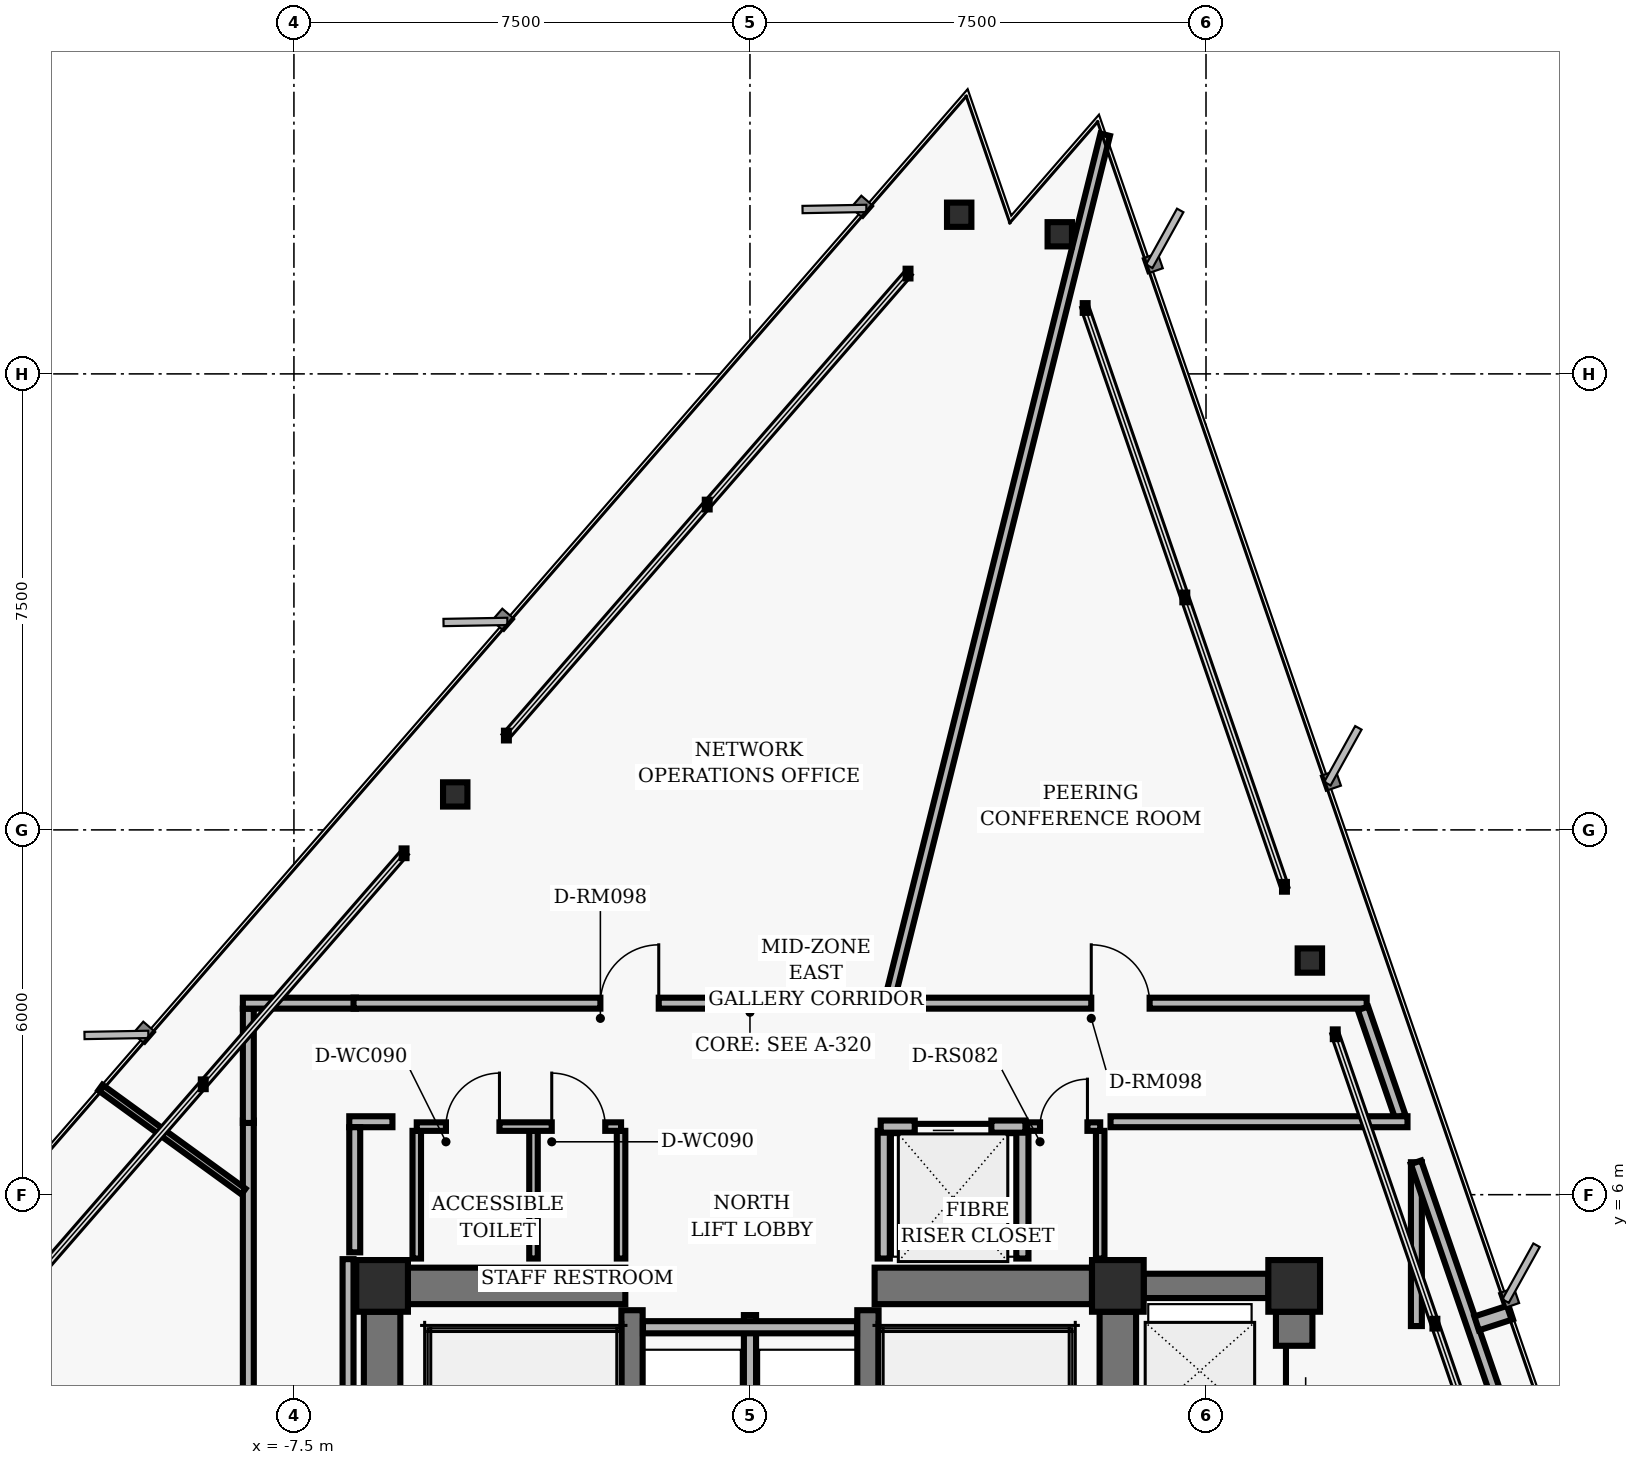
"""IFC4 building model, lengths in metres.
Left out: names, types, materials, properties, quantities, classifications, styles, units other than length and angle.
Written with IfcOpenShell. Run it as: python <this file> out.ifc"""

import sys

from ifc_helpers import new_model, si_unit, direction, frame, frame_2d, origin, origin_2d, place, context, subcontext, project, spatial, rectangle, hollow_rectangle, i_section, extrude, element, fill, save


model = new_model("IFC4")
c1 = context("Model", 3, precision=1e-05, world=origin(), true_north=direction((0.0, 1.0)))
c2 = subcontext(c1, "Body", "Model", "MODEL_VIEW")
j1 = project(units=[si_unit("LENGTHUNIT", "METRE"), si_unit("PLANEANGLEUNIT", "RADIAN")], contexts=[c1])
p1 = place(None, origin())
s1 = spatial("IfcSite", under=j1, at=p1, CompositionType="ELEMENT")
p2 = place(p1, origin())
s2 = spatial("IfcBuilding", under=s1, at=p2, CompositionType="ELEMENT")
p3 = place(p2, frame((0.0, 0.0, 150.24)))
s3 = spatial("IfcBuildingStorey", under=s2, at=p3, CompositionType="ELEMENT", Elevation=150.24)
for number, where, z_axis, x_axis in (
    (1, (-6.05, 4.5, 0.0), (0.0, 0.0, 1.0), (1.0, 0.0, 0.0)),
    (2, (6.05, 4.5, 0.0), (0.0, 0.0, 1.0), (1.0, 0.0, 0.0)),
    (3, (8.95, 4.5, 0.0), (0.0, 0.0, 1.0), (1.0, 0.0, 0.0)),
):
    element("IfcColumn", number, at=place(p3, frame(where, z_axis=z_axis, x_axis=x_axis)), inside=s3, PredefinedType="COLUMN", context=c2, shape_type="SweptSolid", body=[
        extrude(hollow_rectangle(XDim=0.85, YDim=0.85, WallThickness=0.055, InnerFilletRadius=0.02, OuterFilletRadius=0.04, at=origin_2d()), origin(), (0.0, 0.0, 1.0), 3.04),
    ])
for number, where, z_axis, x_axis in (
    (4, (-6.05, 0.425, 0.0), (0.0, 0.0, 1.0), (0.0, 1.0, 0.0)),
    (5, (6.05, 0.425, 0.0), (0.0, 0.0, 1.0), (0.0, 1.0, 0.0)),
):
    element("IfcWall", number, at=place(p3, frame(where, z_axis=z_axis, x_axis=x_axis)), inside=s3, PredefinedType="SHEAR", context=c2, shape_type="SweptSolid", body=[
        extrude(rectangle(XDim=3.65, YDim=0.6, at=frame_2d((1.825, 0.0))), origin(), (0.0, 0.0, 1.0), 2.788),
    ])
for number, where, z_axis, x_axis in (
    (6, (-1.94, -4.1, 0.0), (0.0, 0.0, 1.0), (0.0, 1.0, 0.0)),
    (7, (1.94, -4.1, 0.0), (0.0, 0.0, 1.0), (0.0, 1.0, 0.0)),
):
    element("IfcWall", number, at=place(p3, frame(where, z_axis=z_axis, x_axis=x_axis)), inside=s3, PredefinedType="SHEAR", context=c2, shape_type="SweptSolid", body=[
        extrude(rectangle(XDim=8.2, YDim=0.35, at=frame_2d((4.1, 0.0))), origin(), (0.0, 0.0, 1.0), 2.788),
    ])
for number, where, z_axis, x_axis in (
    (8, (-5.625, 4.5, 0.0), (0.0, 0.0, 1.0), (1.0, 0.0, 0.0)),
    (9, (2.05, 4.5, 0.0), (0.0, 0.0, 1.0), (1.0, 0.0, 0.0)),
):
    element("IfcWall", number, at=place(p3, frame(where, z_axis=z_axis, x_axis=x_axis)), inside=s3, PredefinedType="SHEAR", context=c2, shape_type="SweptSolid", body=[
        extrude(rectangle(XDim=3.575, YDim=0.6, at=frame_2d((1.788, 0.0))), origin(), (0.0, 0.0, 1.0), 2.788),
    ])
p4 = place(p3, frame((8.95, -3.875, 0.0), z_axis=(0.0, 0.0, 1.0), x_axis=(0.0, 1.0, 0.0)))
e10 = element("IfcWall", 10, at=p4, inside=s3, PredefinedType="SHEAR", context=c2, shape_type="SweptSolid", body=[
    extrude(rectangle(XDim=7.95, YDim=0.6, at=frame_2d((3.975, 0.0))), origin(), (0.0, 0.0, 1.0), 2.788),
])
p5 = place(p4, frame((0.55, 0.0, 0.0)))
e11 = element("IfcOpeningElement", 11, at=p5, cuts=e10, PredefinedType="OPENING", context=c2, shape_type="SweptSolid", body=[
    extrude(rectangle(XDim=1.06, YDim=2.04, at=frame_2d((0.53, 1.02))), frame((0.0, 0.31, 0.0), z_axis=(0.0, -1.0, 0.0), x_axis=(1.0, 0.0, 0.0)), (0.0, 0.0, 1.0), 0.62),
])
p6 = place(p4, frame((3.445, 0.0, 0.0)))
e12 = element("IfcOpeningElement", 12, at=p6, cuts=e10, PredefinedType="OPENING", context=c2, shape_type="SweptSolid", body=[
    extrude(rectangle(XDim=1.06, YDim=2.04, at=frame_2d((0.53, 1.02))), frame((0.0, 0.31, 0.0), z_axis=(0.0, -1.0, 0.0), x_axis=(1.0, 0.0, 0.0)), (0.0, 0.0, 1.0), 0.62),
])
p7 = place(p4, frame((6.33, 0.0, 0.0)))
e13 = element("IfcOpeningElement", 13, at=p7, cuts=e10, PredefinedType="OPENING", context=c2, shape_type="SweptSolid", body=[
    extrude(rectangle(XDim=1.06, YDim=2.04, at=frame_2d((0.53, 1.02))), frame((0.0, 0.31, 0.0), z_axis=(0.0, -1.0, 0.0), x_axis=(1.0, 0.0, 0.0)), (0.0, 0.0, 1.0), 0.62),
])
p8 = place(p3, frame((6.475, 4.5, 0.0), z_axis=(0.0, 0.0, 1.0), x_axis=(1.0, 0.0, 0.0)))
e14 = element("IfcWall", 14, at=p8, inside=s3, PredefinedType="SHEAR", context=c2, shape_type="SweptSolid", body=[
    extrude(rectangle(XDim=2.05, YDim=0.4, at=frame_2d((1.025, 0.0))), origin(), (0.0, 0.0, 1.0), 2.788),
])
for number, where, z_axis, x_axis in (
    (15, (9.208, 9.851, 0.0), (0.0, 0.0, 1.0), (1.0, 0.0, 0.0)),
    (16, (5.095, 21.796, 0.0), (0.0, 0.0, 1.0), (1.0, 0.0, 0.0)),
    (17, (3.441, 22.118, 0.0), (0.0, 0.0, 1.0), (1.0, 0.0, 0.0)),
    (18, (-4.847, 12.583, 0.0), (0.0, 0.0, 1.0), (1.0, 0.0, 0.0)),
):
    element("IfcColumn", number, at=place(p3, frame(where, z_axis=z_axis, x_axis=x_axis)), inside=s3, PredefinedType="COLUMN", context=c2, shape_type="SweptSolid", body=[
        extrude(i_section(OverallWidth=0.401, OverallDepth=0.399, WebThickness=0.025, FlangeThickness=0.04, FilletRadius=0.018, at=origin_2d()), origin(), (0.0, 0.0, 1.0), 3.04),
    ])
p9 = place(p3, frame((0.0, 1.25, 0.0), z_axis=(0.0, 0.0, 1.0), x_axis=(0.0, 1.0, 0.0)))
e19 = element("IfcWall", 19, at=p9, inside=s3, PredefinedType="PARTITIONING", context=c2, shape_type="SweptSolid", body=[
    extrude(rectangle(XDim=2.77, YDim=0.2, at=frame_2d((1.385, 0.0))), origin(), (0.0, 0.0, 1.0), 2.763),
])
p10 = place(p3, frame((-1.76, 3.82, 0.0), z_axis=(0.0, 0.0, 1.0), x_axis=(1.0, 0.0, 0.0)))
e20 = element("IfcWall", 20, at=p10, inside=s3, PredefinedType="PARTITIONING", context=c2, shape_type="SweptSolid", body=[
    extrude(rectangle(XDim=3.52, YDim=0.2, at=frame_2d((1.76, 0.0))), origin(), (0.0, 0.0, 1.0), 2.763),
])
for number, where, z_axis, x_axis in (
    (21, (2.2, 4.95, 0.0), (0.0, 0.0, 1.0), (0.0, 1.0, 0.0)),
    (22, (4.48, 4.95, 0.0), (0.0, 0.0, 1.0), (0.0, 1.0, 0.0)),
):
    element("IfcWall", number, at=place(p3, frame(where, z_axis=z_axis, x_axis=x_axis)), inside=s3, PredefinedType="PARTITIONING", context=c2, shape_type="SweptSolid", body=[
        extrude(rectangle(XDim=2.1, YDim=0.2, at=frame_2d((1.05, 0.0))), origin(), (0.0, 0.0, 1.0), 2.763),
    ])
p11 = place(p3, frame((2.15, 7.12, 0.0), z_axis=(0.0, 0.0, 1.0), x_axis=(1.0, 0.0, 0.0)))
e23 = element("IfcWall", 23, at=p11, inside=s3, PredefinedType="PARTITIONING", context=c2, shape_type="SweptSolid", body=[
    extrude(rectangle(XDim=2.38, YDim=0.2, at=frame_2d((1.19, 0.0))), origin(), (0.0, 0.0, 1.0), 2.763),
])
p12 = place(p11, frame((0.56, 0.0, 0.0)))
e24 = element("IfcOpeningElement", 24, at=p12, cuts=e23, PredefinedType="OPENING", context=c2, shape_type="SweptSolid", body=[
    extrude(rectangle(XDim=1.26, YDim=2.06, at=frame_2d((0.63, 1.03))), frame((0.0, 0.11, 0.0), z_axis=(0.0, -1.0, 0.0), x_axis=(1.0, 0.0, 0.0)), (0.0, 0.0, 1.0), 0.22),
])
for number, where, z_axis, x_axis in (
    (25, (-5.48, 4.95, 0.0), (0.0, 0.0, 1.0), (0.0, 1.0, 0.0)),
    (26, (-3.56, 4.95, 0.0), (0.0, 0.0, 1.0), (0.0, 1.0, 0.0)),
    (27, (-2.12, 4.95, 0.0), (0.0, 0.0, 1.0), (0.0, 1.0, 0.0)),
):
    element("IfcWall", number, at=place(p3, frame(where, z_axis=z_axis, x_axis=x_axis)), inside=s3, PredefinedType="PARTITIONING", context=c2, shape_type="SweptSolid", body=[
        extrude(rectangle(XDim=2.1, YDim=0.14, at=frame_2d((1.05, 0.0))), origin(), (0.0, 0.0, 1.0), 2.763),
    ])
p13 = place(p3, frame((-5.48, 7.12, 0.0), z_axis=(0.0, 0.0, 1.0), x_axis=(1.0, 0.0, 0.0)))
e28 = element("IfcWall", 28, at=p13, inside=s3, PredefinedType="PARTITIONING", context=c2, shape_type="SweptSolid", body=[
    extrude(rectangle(XDim=3.36, YDim=0.14, at=frame_2d((1.68, 0.0))), origin(), (0.0, 0.0, 1.0), 2.763),
])
p14 = place(p13, frame((0.48, 0.0, 0.0)))
e29 = element("IfcOpeningElement", 29, at=p14, cuts=e28, PredefinedType="OPENING", context=c2, shape_type="SweptSolid", body=[
    extrude(rectangle(XDim=0.88, YDim=2.02, at=frame_2d((0.44, 1.01))), frame((0.0, 0.08, 0.0), z_axis=(0.0, -1.0, 0.0), x_axis=(1.0, 0.0, 0.0)), (0.0, 0.0, 1.0), 0.16),
])
p15 = place(p13, frame((2.22, 0.0, 0.0)))
e30 = element("IfcOpeningElement", 30, at=p15, cuts=e28, PredefinedType="OPENING", context=c2, shape_type="SweptSolid", body=[
    extrude(rectangle(XDim=0.88, YDim=2.02, at=frame_2d((0.44, 1.01))), frame((0.0, 0.08, 0.0), z_axis=(0.0, -1.0, 0.0), x_axis=(1.0, 0.0, 0.0)), (0.0, 0.0, 1.0), 0.16),
])
p16 = place(p3, frame((5.76, 4.95, 0.0), z_axis=(0.0, 0.0, 1.0), x_axis=(0.0, 1.0, 0.0)))
e31 = element("IfcWall", 31, at=p16, inside=s3, PredefinedType="PARTITIONING", context=c2, shape_type="SweptSolid", body=[
    extrude(rectangle(XDim=2.1, YDim=0.14, at=frame_2d((1.05, 0.0))), origin(), (0.0, 0.0, 1.0), 2.763),
])
p17 = place(p3, frame((4.56, 7.12, 0.0), z_axis=(0.0, 0.0, 1.0), x_axis=(1.0, 0.0, 0.0)))
e32 = element("IfcWall", 32, at=p17, inside=s3, PredefinedType="PARTITIONING", context=c2, shape_type="SweptSolid", body=[
    extrude(rectangle(XDim=1.2, YDim=0.14, at=frame_2d((0.6, 0.0))), origin(), (0.0, 0.0, 1.0), 2.763),
])
p18 = place(p17, frame((0.21, 0.0, 0.0)))
e33 = element("IfcOpeningElement", 33, at=p18, cuts=e32, PredefinedType="OPENING", context=c2, shape_type="SweptSolid", body=[
    extrude(rectangle(XDim=0.78, YDim=2.01, at=frame_2d((0.39, 1.005))), frame((0.0, 0.08, 0.0), z_axis=(0.0, -1.0, 0.0), x_axis=(1.0, 0.0, 0.0)), (0.0, 0.0, 1.0), 0.16),
])
p19 = place(p3, frame((-8.25, -7.22, 0.0), z_axis=(0.0, 0.0, 1.0), x_axis=(0.0, 1.0, 0.0)))
e34 = element("IfcWall", 34, at=p19, inside=s3, PredefinedType="PARTITIONING", context=c2, shape_type="SweptSolid", body=[
    extrude(rectangle(XDim=14.44, YDim=0.18, at=frame_2d((7.22, 0.0))), origin(), (0.0, 0.0, 1.0), 2.763),
])
p20 = place(p19, frame((7.366, 0.0, 0.0)))
e35 = element("IfcOpeningElement", 35, at=p20, cuts=e34, PredefinedType="OPENING", context=c2, shape_type="SweptSolid", body=[
    extrude(rectangle(XDim=0.96, YDim=2.02, at=frame_2d((0.48, 1.01))), frame((0.0, 0.1, 0.0), z_axis=(0.0, -1.0, 0.0), x_axis=(1.0, 0.0, 0.0)), (0.0, 0.0, 1.0), 0.2),
])
p21 = place(p3, frame((-8.25, 7.18, 0.0), z_axis=(0.0, 0.0, 1.0), x_axis=(0.0, 1.0, 0.0)))
e36 = element("IfcWall", 36, at=p21, inside=s3, PredefinedType="PARTITIONING", context=c2, shape_type="SweptSolid", body=[
    extrude(rectangle(XDim=1.88, YDim=0.18, at=frame_2d((0.94, 0.0))), origin(), (0.0, 0.0, 1.0), 2.763),
])
p22 = place(p3, frame((-8.34, 9.15, 0.0), z_axis=(0.0, 0.0, 1.0), x_axis=(1.0, 0.0, 0.0)))
e37 = element("IfcWall", 37, at=p22, inside=s3, PredefinedType="PARTITIONING", context=c2, shape_type="SweptSolid", body=[
    extrude(rectangle(XDim=1.86, YDim=0.18, at=frame_2d((0.93, 0.0))), origin(), (0.0, 0.0, 1.0), 2.763),
])
p23 = place(p3, frame((-6.52, 9.15, 0.0), z_axis=(0.0, 0.0, 1.0), x_axis=(1.0, 0.0, 0.0)))
e38 = element("IfcWall", 38, at=p23, inside=s3, PredefinedType="PARTITIONING", context=c2, shape_type="SweptSolid", body=[
    extrude(rectangle(XDim=16.662, YDim=0.18, at=frame_2d((8.331, 0.0))), origin(), (0.0, 0.0, 1.0), 2.763),
])
p24 = place(p23, frame((12.133, 0.0, 0.0)))
e39 = element("IfcOpeningElement", 39, at=p24, cuts=e38, PredefinedType="OPENING", context=c2, shape_type="SweptSolid", body=[
    extrude(rectangle(XDim=0.96, YDim=2.02, at=frame_2d((0.48, 1.01))), frame((0.0, 0.1, 0.0), z_axis=(0.0, -1.0, 0.0), x_axis=(1.0, 0.0, 0.0)), (0.0, 0.0, 1.0), 0.2),
])
p25 = place(p23, frame((4.06, 0.0, 0.0)))
e40 = element("IfcOpeningElement", 40, at=p25, cuts=e38, PredefinedType="OPENING", context=c2, shape_type="SweptSolid", body=[
    extrude(rectangle(XDim=0.96, YDim=2.02, at=frame_2d((0.48, 1.01))), frame((0.0, 0.1, 0.0), z_axis=(0.0, -1.0, 0.0), x_axis=(1.0, 0.0, 0.0)), (0.0, 0.0, 1.0), 0.2),
])
p26 = place(p3, frame((10.082, 9.065, 0.0), z_axis=(0.0, 0.0, 1.0), x_axis=(0.325550958337, -0.945524496524, 0.0)))
e41 = element("IfcWall", 41, at=p26, inside=s3, PredefinedType="PARTITIONING", context=c2, shape_type="SweptSolid", body=[
    extrude(rectangle(XDim=1.882, YDim=0.18, at=frame_2d((0.941, 0.0))), origin(), (0.0, 0.0, 1.0), 2.763),
])
p27 = place(p3, frame((10.814, 7.2, 0.0), z_axis=(0.0, 0.0, 1.0), x_axis=(-1.0, 0.0, 0.0)))
e42 = element("IfcWall", 42, at=p27, inside=s3, PredefinedType="PARTITIONING", context=c2, shape_type="SweptSolid", body=[
    extrude(rectangle(XDim=4.884, YDim=0.18, at=frame_2d((2.442, 0.0))), origin(), (0.0, 0.0, 1.0), 2.763),
])
p28 = place(p3, frame((-5.88, 7.2, 0.0), z_axis=(0.0, 0.0, 1.0), x_axis=(-1.0, 0.0, 0.0)))
e43 = element("IfcWall", 43, at=p28, inside=s3, PredefinedType="PARTITIONING", context=c2, shape_type="SweptSolid", body=[
    extrude(rectangle(XDim=0.71, YDim=0.18, at=frame_2d((0.355, 0.0))), origin(), (0.0, 0.0, 1.0), 2.763),
])
p29 = place(p3, frame((-6.5, 7.11, 0.0), z_axis=(0.0, 0.0, 1.0), x_axis=(0.0, -1.0, 0.0)))
e44 = element("IfcWall", 44, at=p29, inside=s3, PredefinedType="PARTITIONING", context=c2, shape_type="SweptSolid", body=[
    extrude(rectangle(XDim=2.058, YDim=0.18, at=frame_2d((1.029, 0.0))), origin(), (0.0, 0.0, 1.0), 2.763),
])
p30 = place(p3, frame((-6.61, 4.94, 0.0), z_axis=(0.0, 0.0, 1.0), x_axis=(0.0, -1.0, 0.0)))
e45 = element("IfcWall", 45, at=p30, inside=s3, PredefinedType="PARTITIONING", context=c2, shape_type="SweptSolid", body=[
    extrude(rectangle(XDim=9.46, YDim=0.18, at=frame_2d((4.73, 0.0))), origin(), (0.0, 0.0, 1.0), 2.763),
])
p31 = place(p3, frame((10.96, 3.84, 0.0), z_axis=(0.0, 0.0, 1.0), x_axis=(0.0, 1.0, 0.0)))
e46 = element("IfcWall", 46, at=p31, inside=s3, PredefinedType="PARTITIONING", context=c2, shape_type="SweptSolid", body=[
    extrude(rectangle(XDim=2.694, YDim=0.18, at=frame_2d((1.347, 0.0))), origin(), (0.0, 0.0, 1.0), 2.33),
])
p32 = place(p3, frame((10.954, 6.533, 0.0), z_axis=(0.0, 0.0, 1.0), x_axis=(0.325553439946, -0.945523642084, 0.0)))
e47 = element("IfcWall", 47, at=p32, inside=s3, PredefinedType="PARTITIONING", context=c2, shape_type="SweptSolid", body=[
    extrude(rectangle(XDim=11.22, YDim=0.18, at=frame_2d((5.61, 0.0))), origin(), (0.0, 0.0, 1.0), 2.763),
])
p33 = place(p3, frame((11.95, 3.883, 0.0), z_axis=(0.0, 0.0, 1.0), x_axis=(0.951055346906, 0.309020593362, 0.0)))
e48 = element("IfcWall", 48, at=p33, inside=s3, PredefinedType="PARTITIONING", context=c2, shape_type="SweptSolid", body=[
    extrude(rectangle(XDim=0.59, YDim=0.24, at=frame_2d((0.295, 0.0))), origin(), (0.0, 0.0, 1.0), 2.763),
])
p34 = place(p3, frame((2.301, 9.23, 0.0), z_axis=(0.0, 0.0, 1.0), x_axis=(0.241931245301, 0.970293395086, 0.0)))
e49 = element("IfcWall", 49, at=p34, inside=s3, PredefinedType="PARTITIONING", context=c2, shape_type="SweptSolid", body=[
    extrude(rectangle(XDim=14.638, YDim=0.16, at=frame_2d((7.319, 0.0))), origin(), (0.0, 0.0, 1.0), 2.763),
])
p35 = place(p3, frame((-8.33, 6.052, 0.0), z_axis=(0.0, 0.0, 1.0), x_axis=(-0.808997455981, 0.587812143644, 0.0)))
e50 = element("IfcWall", 50, at=p35, inside=s3, PredefinedType="MOVABLE", context=c2, shape_type="SweptSolid", body=[
    extrude(rectangle(XDim=2.907, YDim=0.115, at=frame_2d((1.454, 0.0))), origin(), (0.0, 0.0, 1.0), 2.763),
])
p36 = place(p12, origin())
e51 = element("IfcDoor", 51, at=p36, inside=s3, OperationType="SLIDING_TO_LEFT", PredefinedType="DOOR", context=c2, shape_type="SweptSolid", body=[
    extrude(rectangle(XDim=1.26, YDim=2.06, at=frame_2d((0.63, 1.03))), frame((0.0, 0.025, 0.0), z_axis=(0.0, -1.0, 0.0), x_axis=(1.0, 0.0, 0.0)), (0.0, 0.0, 1.0), 0.05),
])
fill(e24, e51)
p37 = place(p14, origin())
e52 = element("IfcDoor", 52, at=p37, inside=s3, OperationType="SINGLE_SWING_RIGHT", PredefinedType="DOOR", context=c2, shape_type="SweptSolid", body=[
    extrude(rectangle(XDim=0.88, YDim=2.02, at=frame_2d((0.44, 1.01))), frame((0.0, 0.025, 0.0), z_axis=(0.0, -1.0, 0.0), x_axis=(1.0, 0.0, 0.0)), (0.0, 0.0, 1.0), 0.05),
])
fill(e29, e52)
p38 = place(p15, origin())
e53 = element("IfcDoor", 53, at=p38, inside=s3, OperationType="SINGLE_SWING_LEFT", PredefinedType="DOOR", context=c2, shape_type="SweptSolid", body=[
    extrude(rectangle(XDim=0.88, YDim=2.02, at=frame_2d((0.44, 1.01))), frame((0.0, 0.025, 0.0), z_axis=(0.0, -1.0, 0.0), x_axis=(1.0, 0.0, 0.0)), (0.0, 0.0, 1.0), 0.05),
])
fill(e30, e53)
p39 = place(p18, origin())
e54 = element("IfcDoor", 54, at=p39, inside=s3, OperationType="SINGLE_SWING_RIGHT", PredefinedType="DOOR", context=c2, shape_type="SweptSolid", body=[
    extrude(rectangle(XDim=0.78, YDim=2.01, at=frame_2d((0.39, 1.005))), frame((0.0, 0.025, 0.0), z_axis=(0.0, -1.0, 0.0), x_axis=(1.0, 0.0, 0.0)), (0.0, 0.0, 1.0), 0.05),
])
fill(e33, e54)
p40 = place(p7, origin())
e55 = element("IfcDoor", 55, at=p40, inside=s3, OperationType="SLIDING_TO_LEFT", PredefinedType="DOOR", context=c2, shape_type="SweptSolid", body=[
    extrude(rectangle(XDim=1.06, YDim=2.04, at=frame_2d((0.53, 1.02))), frame((0.0, 0.025, 0.0), z_axis=(0.0, -1.0, 0.0), x_axis=(1.0, 0.0, 0.0)), (0.0, 0.0, 1.0), 0.05),
])
fill(e13, e55)
p41 = place(p24, origin())
e56 = element("IfcDoor", 56, at=p41, inside=s3, OperationType="SINGLE_SWING_LEFT", PredefinedType="DOOR", context=c2, shape_type="SweptSolid", body=[
    extrude(rectangle(XDim=0.96, YDim=2.02, at=frame_2d((0.48, 1.01))), frame((0.0, 0.025, 0.0), z_axis=(0.0, -1.0, 0.0), x_axis=(1.0, 0.0, 0.0)), (0.0, 0.0, 1.0), 0.05),
])
fill(e39, e56)
p42 = place(p25, origin())
e57 = element("IfcDoor", 57, at=p42, inside=s3, OperationType="SINGLE_SWING_RIGHT", PredefinedType="DOOR", context=c2, shape_type="SweptSolid", body=[
    extrude(rectangle(XDim=0.96, YDim=2.02, at=frame_2d((0.48, 1.01))), frame((0.0, 0.025, 0.0), z_axis=(0.0, -1.0, 0.0), x_axis=(1.0, 0.0, 0.0)), (0.0, 0.0, 1.0), 0.05),
])
fill(e40, e57)
save(model, sys.argv[1])
